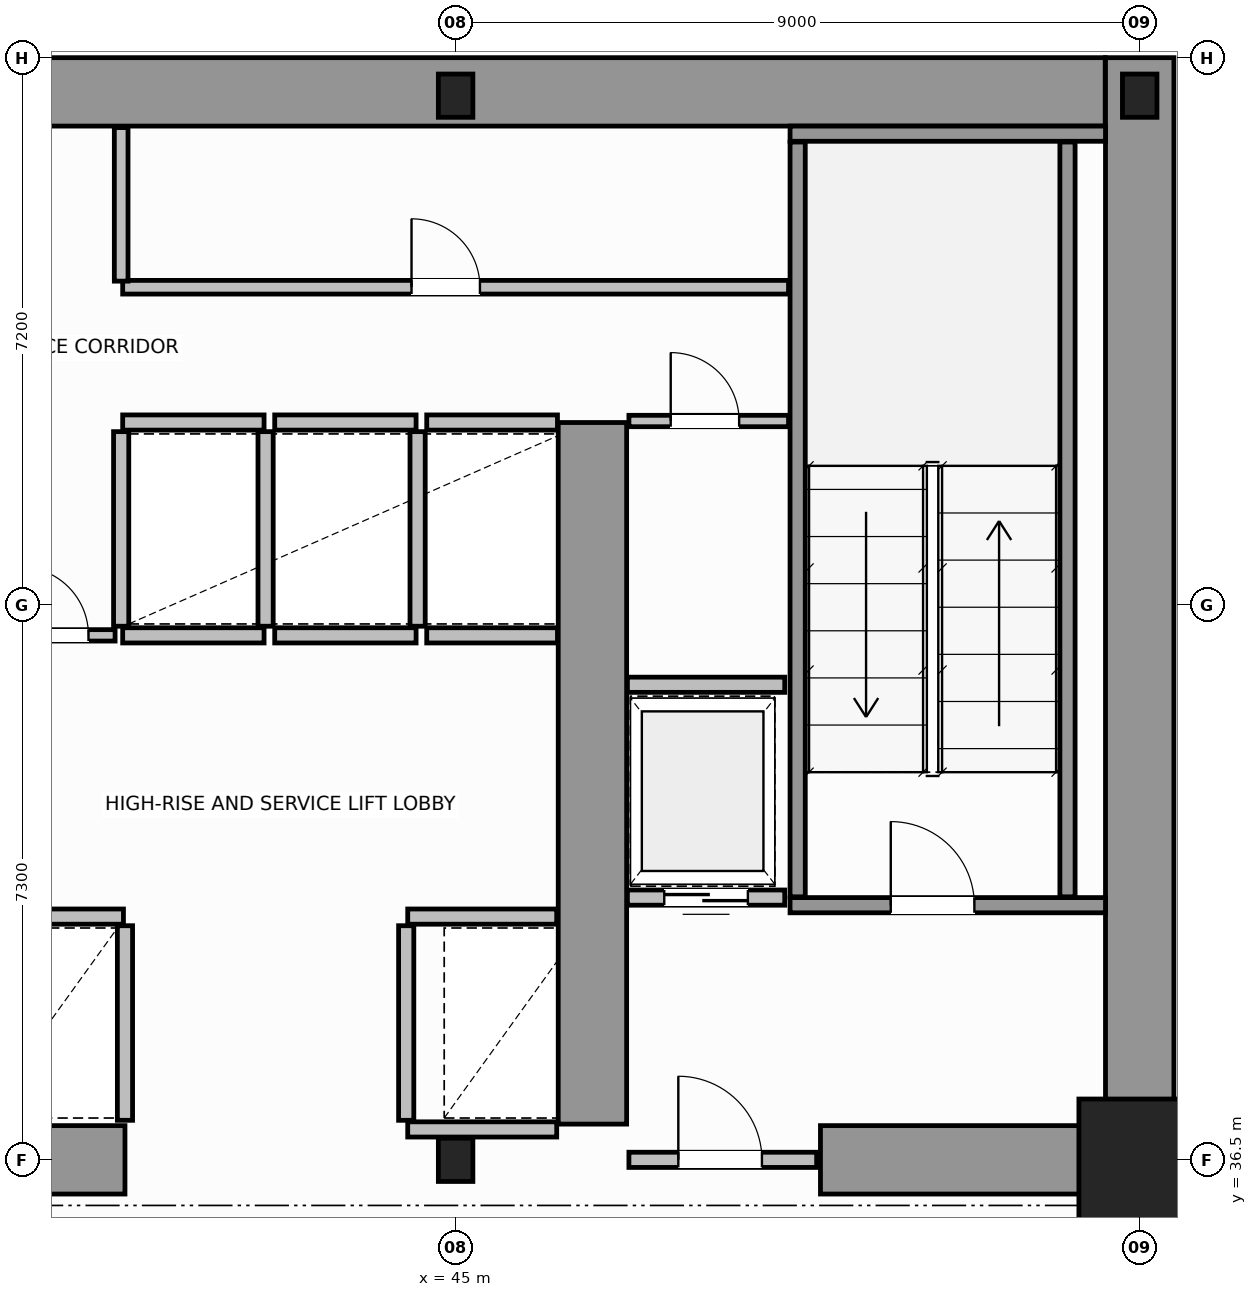
"""IFC4 building model, lengths in metres.
Left out: names, types, materials, properties, quantities, classifications, styles, units other than length and angle.
Written with IfcOpenShell. Run it as: python <this file> out.ifc"""

import sys

from ifc_helpers import new_model, si_unit, direction, frame, frame_2d, origin, origin_2d, place, context, subcontext, project, spatial, rectangle, i_section, extrude, source, transform, mapped, element, fill, save


model = new_model("IFC4")
c1 = context("Model", 3, precision=1e-05, world=origin(), true_north=direction((0.0, 1.0)))
c2 = subcontext(c1, "Body", "Model", "MODEL_VIEW")
j1 = project(units=[si_unit("LENGTHUNIT", "METRE"), si_unit("PLANEANGLEUNIT", "RADIAN")], contexts=[c1])
p1 = place(None, origin())
s1 = spatial("IfcSite", under=j1, at=p1, CompositionType="ELEMENT")
p2 = place(p1, origin())
s2 = spatial("IfcBuilding", under=s1, at=p2, CompositionType="ELEMENT")
p3 = place(p2, frame((0.0, 0.0, 10.0)))
s3 = spatial("IfcBuildingStorey", under=s2, at=p3, CompositionType="ELEMENT", Elevation=10.0)
m1 = source(origin(), c2, "Body", "SweptSolid", [
    extrude(i_section(OverallWidth=0.454, OverallDepth=0.569, WebThickness=0.078, FlangeThickness=0.08, FilletRadius=0.015, at=origin_2d()), origin(), (0.0, 0.0, 1.0), 4.4),
])
p4 = place(p3, frame((45.0, 36.5, 0.0), z_axis=(0.0, 0.0, 1.0), x_axis=(1.0, 0.0, 0.0)))
e1 = element("IfcColumn", 1, at=p4, inside=s3, PredefinedType="COLUMN", context=c2, shape_type="MappedRepresentation", body=[
    mapped(m1, transform((0.0, 0.0, 0.0), scale=1.0)),
])
m2 = source(origin(), c2, "Body", "SweptSolid", [
    extrude(rectangle(XDim=1.6, YDim=1.6, at=origin_2d()), origin(), (0.0, 0.0, 1.0), 4.4),
])
p5 = place(p3, frame((54.0, 36.5, 0.0), z_axis=(0.0, 0.0, 1.0), x_axis=(1.0, 0.0, 0.0)))
e2 = element("IfcColumn", 2, at=p5, inside=s3, PredefinedType="COLUMN", context=c2, shape_type="MappedRepresentation", body=[
    mapped(m2, transform((0.0, 0.0, 0.0), scale=1.0)),
])
for number, where, z_axis, x_axis in (
    (3, (45.0, 50.5, 0.0), (0.0, 0.0, 1.0), (1.0, 0.0, 0.0)),
    (4, (54.0, 50.5, 0.0), (0.0, 0.0, 1.0), (1.0, 0.0, 0.0)),
):
    element("IfcColumn", number, at=place(p3, frame(where, z_axis=z_axis, x_axis=x_axis)), inside=s3, PredefinedType="COLUMN", context=c2, shape_type="MappedRepresentation", body=[
        mapped(m1, transform((0.0, 0.0, 0.0), scale=1.0)),
    ])
p6 = place(p3, frame((34.002, 50.55, 0.0), z_axis=(0.0, 0.0, 1.0), x_axis=(1.0, 0.0, 0.0)))
e5 = element("IfcWall", 5, at=p6, inside=s3, PredefinedType="SHEAR", context=c2, shape_type="SweptSolid", body=[
    extrude(rectangle(XDim=19.544, YDim=0.9, at=frame_2d((9.772, 0.0))), origin(), (0.0, 0.0, 1.0), 4.4),
])
p7 = place(p3, frame((54.0, 36.5, 0.0), z_axis=(0.0, 0.0, 1.0), x_axis=(0.0, 1.0, 0.0)))
e6 = element("IfcWall", 6, at=p7, inside=s3, PredefinedType="SHEAR", context=c2, shape_type="SweptSolid", body=[
    extrude(rectangle(XDim=14.5, YDim=0.9, at=frame_2d((7.25, 0.0))), origin(), (0.0, 0.0, 1.0), 4.4),
])
p8 = place(p3, frame((36.15, 36.5, 0.0), z_axis=(0.0, 0.0, 1.0), x_axis=(1.0, 0.0, 0.0)))
e7 = element("IfcWall", 7, at=p8, inside=s3, PredefinedType="SHEAR", context=c2, shape_type="SweptSolid", body=[
    extrude(rectangle(XDim=4.5, YDim=0.9, at=frame_2d((2.25, 0.0))), origin(), (0.0, 0.0, 1.0), 4.4),
])
p9 = place(p3, frame((49.8, 36.5, 0.0), z_axis=(0.0, 0.0, 1.0), x_axis=(1.0, 0.0, 0.0)))
e8 = element("IfcWall", 8, at=p9, inside=s3, PredefinedType="SHEAR", context=c2, shape_type="SweptSolid", body=[
    extrude(rectangle(XDim=3.73, YDim=0.9, at=frame_2d((1.865, 0.0))), origin(), (0.0, 0.0, 1.0), 2.92),
])
p10 = place(p3, frame((46.8, 36.97, 0.0), z_axis=(0.0, 0.0, 1.0), x_axis=(0.0, 1.0, 0.0)))
e9 = element("IfcWall", 9, at=p10, inside=s3, PredefinedType="SHEAR", context=c2, shape_type="SweptSolid", body=[
    extrude(rectangle(XDim=9.23, YDim=0.9, at=frame_2d((4.615, 0.0))), origin(), (0.0, 0.0, 1.0), 4.4),
])
p11 = place(p3, frame((49.4, 39.85, 0.0), z_axis=(0.0, 0.0, 1.0), x_axis=(1.0, 0.0, 0.0)))
e10 = element("IfcWall", 10, at=p11, inside=s3, PredefinedType="SOLIDWALL", context=c2, shape_type="SweptSolid", body=[
    extrude(rectangle(XDim=4.15, YDim=0.2, at=frame_2d((2.075, 0.0))), origin(), (0.0, 0.0, 1.0), 4.4),
])
p12 = place(p11, frame((1.325, 0.0, 0.0)))
e11 = element("IfcOpeningElement", 11, at=p12, cuts=e10, PredefinedType="OPENING", context=c2, shape_type="SweptSolid", body=[
    extrude(rectangle(XDim=1.1, YDim=2.15, at=frame_2d((0.55, 1.075))), frame((0.0, 0.11, 0.0), z_axis=(0.0, -1.0, 0.0), x_axis=(1.0, 0.0, 0.0)), (0.0, 0.0, 1.0), 0.22),
])
p13 = place(p3, frame((49.4, 50.0, 0.0), z_axis=(0.0, 0.0, 1.0), x_axis=(1.0, 0.0, 0.0)))
e12 = element("IfcWall", 12, at=p13, inside=s3, PredefinedType="SOLIDWALL", context=c2, shape_type="SweptSolid", body=[
    extrude(rectangle(XDim=4.15, YDim=0.2, at=frame_2d((2.075, 0.0))), origin(), (0.0, 0.0, 1.0), 4.4),
])
for number, where, z_axis, x_axis in (
    (13, (49.5, 39.96, 0.0), (0.0, 0.0, 1.0), (0.0, 1.0, 0.0)),
    (14, (53.05, 39.96, 0.0), (0.0, 0.0, 1.0), (0.0, 1.0, 0.0)),
):
    element("IfcWall", number, at=place(p3, frame(where, z_axis=z_axis, x_axis=x_axis)), inside=s3, PredefinedType="SOLIDWALL", context=c2, shape_type="SweptSolid", body=[
        extrude(rectangle(XDim=9.93, YDim=0.2, at=frame_2d((4.965, 0.0))), origin(), (0.0, 0.0, 1.0), 4.4),
    ])
p14 = place(p3, frame((47.28, 36.5, 0.0), z_axis=(0.0, 0.0, 1.0), x_axis=(1.0, 0.0, 0.0)))
e15 = element("IfcWall", 15, at=p14, inside=s3, PredefinedType="SOLIDWALL", context=c2, shape_type="SweptSolid", body=[
    extrude(rectangle(XDim=2.47, YDim=0.2, at=frame_2d((1.235, 0.0))), origin(), (0.0, 0.0, 1.0), 2.91),
])
p15 = place(p14, frame((0.65, 0.0, 0.0)))
e16 = element("IfcOpeningElement", 16, at=p15, cuts=e15, PredefinedType="OPENING", context=c2, shape_type="SweptSolid", body=[
    extrude(rectangle(XDim=1.1, YDim=2.15, at=frame_2d((0.55, 1.075))), frame((0.0, 0.11, 0.0), z_axis=(0.0, -1.0, 0.0), x_axis=(1.0, 0.0, 0.0)), (0.0, 0.0, 1.0), 0.22),
])
p16 = place(p3, frame((38.86, 39.7, 0.0), z_axis=(0.0, 0.0, 1.0), x_axis=(1.0, 0.0, 0.0)))
e17 = element("IfcWall", 17, at=p16, inside=s3, PredefinedType="SOLIDWALL", context=c2, shape_type="SweptSolid", body=[
    extrude(rectangle(XDim=1.77, YDim=0.2, at=frame_2d((0.885, 0.0))), origin(), (0.0, 0.0, 1.0), 4.12),
])
p17 = place(p3, frame((40.65, 37.02, 0.0), z_axis=(0.0, 0.0, 1.0), x_axis=(0.0, 1.0, 0.0)))
e18 = element("IfcWall", 18, at=p17, inside=s3, PredefinedType="SOLIDWALL", context=c2, shape_type="SweptSolid", body=[
    extrude(rectangle(XDim=2.56, YDim=0.2, at=frame_2d((1.28, 0.0))), origin(), (0.0, 0.0, 1.0), 4.12),
])
p18 = place(p3, frame((44.37, 39.7, 0.0), z_axis=(0.0, 0.0, 1.0), x_axis=(1.0, 0.0, 0.0)))
e19 = element("IfcWall", 19, at=p18, inside=s3, PredefinedType="SOLIDWALL", context=c2, shape_type="SweptSolid", body=[
    extrude(rectangle(XDim=1.96, YDim=0.2, at=frame_2d((0.98, 0.0))), origin(), (0.0, 0.0, 1.0), 4.12),
])
p19 = place(p3, frame((44.37, 36.9, 0.0), z_axis=(0.0, 0.0, 1.0), x_axis=(1.0, 0.0, 0.0)))
e20 = element("IfcWall", 20, at=p19, inside=s3, PredefinedType="SOLIDWALL", context=c2, shape_type="SweptSolid", body=[
    extrude(rectangle(XDim=1.96, YDim=0.2, at=frame_2d((0.98, 0.0))), origin(), (0.0, 0.0, 1.0), 2.91),
])
p20 = place(p3, frame((44.35, 37.02, 0.0), z_axis=(0.0, 0.0, 1.0), x_axis=(0.0, 1.0, 0.0)))
e21 = element("IfcWall", 21, at=p20, inside=s3, PredefinedType="SOLIDWALL", context=c2, shape_type="SweptSolid", body=[
    extrude(rectangle(XDim=2.56, YDim=0.2, at=frame_2d((1.28, 0.0))), origin(), (0.0, 0.0, 1.0), 4.12),
])
for number, where, z_axis, x_axis in (
    (22, (40.62, 43.4, 0.0), (0.0, 0.0, 1.0), (1.0, 0.0, 0.0)),
    (23, (40.62, 46.2, 0.0), (0.0, 0.0, 1.0), (1.0, 0.0, 0.0)),
):
    element("IfcWall", number, at=place(p3, frame(where, z_axis=z_axis, x_axis=x_axis)), inside=s3, PredefinedType="SOLIDWALL", context=c2, shape_type="SweptSolid", body=[
        extrude(rectangle(XDim=1.86, YDim=0.2, at=frame_2d((0.93, 0.0))), origin(), (0.0, 0.0, 1.0), 4.12),
    ])
for number, where, z_axis, x_axis in (
    (24, (40.6, 43.52, 0.0), (0.0, 0.0, 1.0), (0.0, 1.0, 0.0)),
    (25, (42.5, 43.52, 0.0), (0.0, 0.0, 1.0), (0.0, 1.0, 0.0)),
):
    element("IfcWall", number, at=place(p3, frame(where, z_axis=z_axis, x_axis=x_axis)), inside=s3, PredefinedType="SOLIDWALL", context=c2, shape_type="SweptSolid", body=[
        extrude(rectangle(XDim=2.56, YDim=0.2, at=frame_2d((1.28, 0.0))), origin(), (0.0, 0.0, 1.0), 4.12),
    ])
for number, where, z_axis, x_axis in (
    (26, (42.62, 43.4, 0.0), (0.0, 0.0, 1.0), (1.0, 0.0, 0.0)),
    (27, (42.62, 46.2, 0.0), (0.0, 0.0, 1.0), (1.0, 0.0, 0.0)),
):
    element("IfcWall", number, at=place(p3, frame(where, z_axis=z_axis, x_axis=x_axis)), inside=s3, PredefinedType="SOLIDWALL", context=c2, shape_type="SweptSolid", body=[
        extrude(rectangle(XDim=1.86, YDim=0.2, at=frame_2d((0.93, 0.0))), origin(), (0.0, 0.0, 1.0), 4.12),
    ])
p21 = place(p3, frame((44.5, 43.52, 0.0), z_axis=(0.0, 0.0, 1.0), x_axis=(0.0, 1.0, 0.0)))
e28 = element("IfcWall", 28, at=p21, inside=s3, PredefinedType="SOLIDWALL", context=c2, shape_type="SweptSolid", body=[
    extrude(rectangle(XDim=2.56, YDim=0.2, at=frame_2d((1.28, 0.0))), origin(), (0.0, 0.0, 1.0), 4.12),
])
for number, where, z_axis, x_axis in (
    (29, (44.62, 43.4, 0.0), (0.0, 0.0, 1.0), (1.0, 0.0, 0.0)),
    (30, (44.62, 46.2, 0.0), (0.0, 0.0, 1.0), (1.0, 0.0, 0.0)),
):
    element("IfcWall", number, at=place(p3, frame(where, z_axis=z_axis, x_axis=x_axis)), inside=s3, PredefinedType="SOLIDWALL", context=c2, shape_type="SweptSolid", body=[
        extrude(rectangle(XDim=1.72, YDim=0.2, at=frame_2d((0.86, 0.0))), origin(), (0.0, 0.0, 1.0), 4.12),
    ])
p22 = place(p3, frame((47.26, 39.95, 0.0), z_axis=(0.0, 0.0, 1.0), x_axis=(1.0, 0.0, 0.0)))
e31 = element("IfcWall", 31, at=p22, inside=s3, PredefinedType="SOLIDWALL", context=c2, shape_type="SweptSolid", body=[
    extrude(rectangle(XDim=2.07, YDim=0.2, at=frame_2d((1.035, 0.0))), origin(), (0.0, 0.0, 1.0), 4.12),
])
p23 = place(p22, frame((0.485, 0.0, 0.0)))
e32 = element("IfcOpeningElement", 32, at=p23, cuts=e31, PredefinedType="OPENING", context=c2, shape_type="SweptSolid", body=[
    extrude(rectangle(XDim=1.1, YDim=2.15, at=frame_2d((0.55, 1.075))), frame((0.0, 0.11, 0.0), z_axis=(0.0, -1.0, 0.0), x_axis=(1.0, 0.0, 0.0)), (0.0, 0.0, 1.0), 0.22),
])
p24 = place(p3, frame((47.26, 42.75, 0.0), z_axis=(0.0, 0.0, 1.0), x_axis=(1.0, 0.0, 0.0)))
e33 = element("IfcWall", 33, at=p24, inside=s3, PredefinedType="SOLIDWALL", context=c2, shape_type="SweptSolid", body=[
    extrude(rectangle(XDim=2.07, YDim=0.2, at=frame_2d((1.035, 0.0))), origin(), (0.0, 0.0, 1.0), 4.12),
])
p25 = place(p3, frame((47.28, 46.22, 0.0), z_axis=(0.0, 0.0, 1.0), x_axis=(1.0, 0.0, 0.0)))
e34 = element("IfcWall", 34, at=p25, inside=s3, PredefinedType="PARTITIONING", context=c2, shape_type="SweptSolid", body=[
    extrude(rectangle(XDim=2.1, YDim=0.15, at=frame_2d((1.05, 0.0))), origin(), (0.0, 0.0, 1.0), 4.12),
])
p26 = place(p25, frame((0.55, 0.0, 0.0)))
e35 = element("IfcOpeningElement", 35, at=p26, cuts=e34, PredefinedType="OPENING", context=c2, shape_type="SweptSolid", body=[
    extrude(rectangle(XDim=0.9, YDim=2.1, at=frame_2d((0.45, 1.05))), frame((0.0, 0.085, 0.0), z_axis=(0.0, -1.0, 0.0), x_axis=(1.0, 0.0, 0.0)), (0.0, 0.0, 1.0), 0.17),
])
p27 = place(p3, frame((38.92, 43.4, 0.0), z_axis=(0.0, 0.0, 1.0), x_axis=(1.0, 0.0, 0.0)))
e36 = element("IfcWall", 36, at=p27, inside=s3, PredefinedType="PARTITIONING", context=c2, shape_type="SweptSolid", body=[
    extrude(rectangle(XDim=1.6, YDim=0.15, at=frame_2d((0.8, 0.0))), origin(), (0.0, 0.0, 1.0), 4.12),
])
p28 = place(p27, frame((0.35, 0.0, 0.0)))
e37 = element("IfcOpeningElement", 37, at=p28, cuts=e36, PredefinedType="OPENING", context=c2, shape_type="SweptSolid", body=[
    extrude(rectangle(XDim=0.9, YDim=2.1, at=frame_2d((0.45, 1.05))), frame((0.0, 0.085, 0.0), z_axis=(0.0, -1.0, 0.0), x_axis=(1.0, 0.0, 0.0)), (0.0, 0.0, 1.0), 0.17),
])
p29 = place(p3, frame((40.62, 47.98, 0.0), z_axis=(0.0, 0.0, 1.0), x_axis=(1.0, 0.0, 0.0)))
e38 = element("IfcWall", 38, at=p29, inside=s3, PredefinedType="PLUMBINGWALL", context=c2, shape_type="SweptSolid", body=[
    extrude(rectangle(XDim=8.76, YDim=0.18, at=frame_2d((4.38, 0.0))), origin(), (0.0, 0.0, 1.0), 4.12),
])
p30 = place(p29, frame((3.8, 0.0, 0.0)))
e39 = element("IfcOpeningElement", 39, at=p30, cuts=e38, PredefinedType="OPENING", context=c2, shape_type="SweptSolid", body=[
    extrude(rectangle(XDim=0.9, YDim=2.15, at=frame_2d((0.45, 1.075))), frame((0.0, 0.1, 0.0), z_axis=(0.0, -1.0, 0.0), x_axis=(1.0, 0.0, 0.0)), (0.0, 0.0, 1.0), 0.2),
])
p31 = place(p3, frame((40.6, 48.06, 0.0), z_axis=(0.0, 0.0, 1.0), x_axis=(0.0, 1.0, 0.0)))
e40 = element("IfcWall", 40, at=p31, inside=s3, PredefinedType="PLUMBINGWALL", context=c2, shape_type="SweptSolid", body=[
    extrude(rectangle(XDim=2.02, YDim=0.18, at=frame_2d((1.01, 0.0))), origin(), (0.0, 0.0, 1.0), 4.12),
])
m3 = source(origin(), c2, "Body", "SweptSolid", [
    extrude(rectangle(XDim=1.1, YDim=2.15, at=frame_2d((0.55, 1.075))), frame((0.0, 0.025, 0.0), z_axis=(0.0, -1.0, 0.0), x_axis=(1.0, 0.0, 0.0)), (0.0, 0.0, 1.0), 0.05),
])
p32 = place(p12, origin())
e41 = element("IfcDoor", 41, at=p32, inside=s3, OperationType="SINGLE_SWING_RIGHT", PredefinedType="DOOR", context=c2, shape_type="MappedRepresentation", body=[
    mapped(m3, transform((0.0, 0.0, 0.0), scale=1.0)),
])
fill(e11, e41)
p33 = place(p15, origin())
e42 = element("IfcDoor", 42, at=p33, inside=s3, OperationType="SINGLE_SWING_LEFT", PredefinedType="DOOR", context=c2, shape_type="MappedRepresentation", body=[
    mapped(m3, transform((0.0, 0.0, 0.0), scale=1.0)),
])
fill(e16, e42)
p34 = place(p23, origin())
e43 = element("IfcDoor", 43, at=p34, inside=s3, OperationType="DOUBLE_DOOR_SLIDING", PredefinedType="DOOR", context=c2, shape_type="MappedRepresentation", body=[
    mapped(m3, transform((0.0, 0.0, 0.0), scale=1.0)),
])
fill(e32, e43)
m4 = source(origin(), c2, "Body", "SweptSolid", [
    extrude(rectangle(XDim=0.9, YDim=2.1, at=frame_2d((0.45, 1.05))), frame((0.0, 0.025, 0.0), z_axis=(0.0, -1.0, 0.0), x_axis=(1.0, 0.0, 0.0)), (0.0, 0.0, 1.0), 0.05),
])
p35 = place(p26, origin())
e44 = element("IfcDoor", 44, at=p35, inside=s3, OperationType="SINGLE_SWING_RIGHT", PredefinedType="DOOR", context=c2, shape_type="MappedRepresentation", body=[
    mapped(m4, transform((0.0, 0.0, 0.0), scale=1.0)),
])
fill(e35, e44)
p36 = place(p28, origin())
e45 = element("IfcDoor", 45, at=p36, inside=s3, OperationType="SINGLE_SWING_LEFT", PredefinedType="DOOR", context=c2, shape_type="MappedRepresentation", body=[
    mapped(m4, transform((0.0, 0.0, 0.0), scale=1.0)),
])
fill(e37, e45)
m5 = source(origin(), c2, "Body", "SweptSolid", [
    extrude(rectangle(XDim=0.9, YDim=2.15, at=frame_2d((0.45, 1.075))), frame((0.0, 0.025, 0.0), z_axis=(0.0, -1.0, 0.0), x_axis=(1.0, 0.0, 0.0)), (0.0, 0.0, 1.0), 0.05),
])
p37 = place(p30, origin())
e46 = element("IfcDoor", 46, at=p37, inside=s3, OperationType="SINGLE_SWING_RIGHT", PredefinedType="DOOR", context=c2, shape_type="MappedRepresentation", body=[
    mapped(m5, transform((0.0, 0.0, 0.0), scale=1.0)),
])
fill(e39, e46)
save(model, sys.argv[1])
